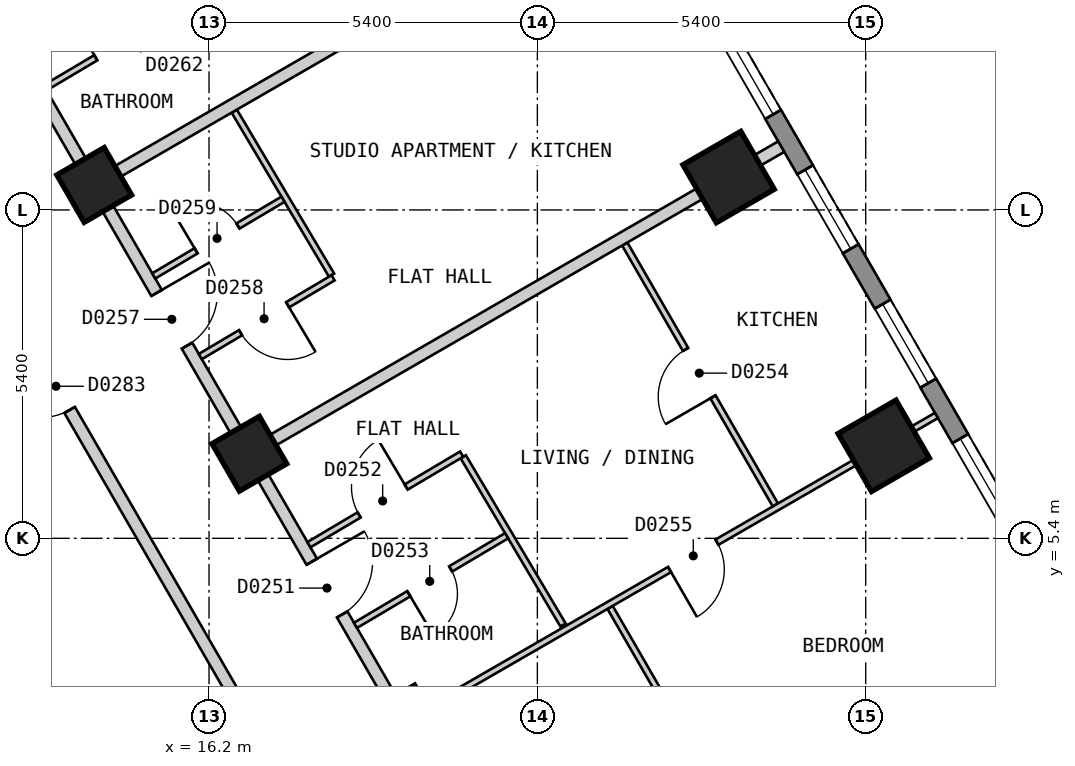
"""IFC4 building model, lengths in metres.
Left out: names, types, materials, properties, quantities, classifications, styles, units other than length and angle.
Written with IfcOpenShell. Run it as: python <this file> out.ifc"""

import sys

from ifc_helpers import new_model, si_unit, direction, frame, frame_2d, origin, origin_2d, place, context, subcontext, project, spatial, polyline, rectangle, outline, extrude, element, fill, save


model = new_model("IFC4")
c1 = context("Model", 3, precision=1e-05, world=origin(), true_north=direction((0.0, 1.0)))
c2 = subcontext(c1, "Body", "Model", "MODEL_VIEW")
j1 = project(units=[si_unit("LENGTHUNIT", "METRE"), si_unit("PLANEANGLEUNIT", "RADIAN")], contexts=[c1])
p1 = place(None, origin())
s1 = spatial("IfcSite", under=j1, at=p1, CompositionType="ELEMENT")
p2 = place(p1, origin())
s2 = spatial("IfcBuilding", under=s1, at=p2, CompositionType="ELEMENT")
p3 = place(p2, frame((0.0, 0.0, 41.4)))
s3 = spatial("IfcBuildingStorey", under=s2, at=p3, CompositionType="ELEMENT", Elevation=41.4)
for number, where, z_axis, x_axis in (
    (1, (29.848, 2.5, 0.0), (0.0, 0.0, 1.0), (-0.5, 0.866, 0.0)),
    (2, (27.297, 6.921, 0.0), (0.0, 0.0, 1.0), (-0.5, 0.866, 0.0)),
    (3, (24.745, 11.341, 0.0), (0.0, 0.0, 1.0), (-0.5, 0.866, 0.0)),
):
    element("IfcColumn", number, at=place(p3, frame(where, z_axis=z_axis, x_axis=x_axis)), inside=s3, PredefinedType="COLUMN", context=c2, shape_type="SweptSolid", body=[
        extrude(rectangle(XDim=1.1, YDim=1.1, at=origin_2d()), origin(), (0.0, 0.0, 1.0), 3.0),
    ])
for number, where, z_axis, x_axis in (
    (4, (19.416, 2.371, 0.0), (0.0, 0.0, 1.0), (-0.5, 0.866, 0.0)),
    (5, (16.864, 6.791, 0.0), (0.0, 0.0, 1.0), (-0.5, 0.866, 0.0)),
    (6, (14.312, 11.211, 0.0), (0.0, 0.0, 1.0), (-0.5, 0.866, 0.0)),
):
    element("IfcColumn", number, at=place(p3, frame(where, z_axis=z_axis, x_axis=x_axis)), inside=s3, PredefinedType="COLUMN", context=c2, shape_type="SweptSolid", body=[
        extrude(rectangle(XDim=0.9, YDim=0.9, at=origin_2d()), origin(), (0.0, 0.0, 1.0), 3.0),
    ])
p4 = place(p3, frame((31.22, 2.425, 0.0), z_axis=(0.0, 0.0, 1.0), x_axis=(-0.500001938803, 0.866024284413, 0.0)))
e7 = element("IfcWall", 7, at=p4, inside=s3, PredefinedType="SOLIDWALL", context=c2, shape_type="SweptSolid", body=[
    extrude(outline(polyline([(0.0, -0.15), (27.02, -0.15), (26.94, 0.15), (0.08, 0.15), (0.0, -0.15)])), origin(), (0.0, 0.0, 1.0), 2.7),
])
p5 = place(p4, frame((1.277, 0.0, 0.15)))
e8 = element("IfcOpeningElement", 8, at=p5, cuts=e7, PredefinedType="OPENING", context=c2, shape_type="SweptSolid", body=[
    extrude(rectangle(XDim=1.5, YDim=2.1, at=frame_2d((0.75, 1.05))), frame((0.0, 0.16, 0.0), z_axis=(0.0, -1.0, 0.0), x_axis=(1.0, 0.0, 0.0)), (0.0, 0.0, 1.0), 0.32),
])
p6 = place(p4, frame((3.829, 0.0, 0.15)))
e9 = element("IfcOpeningElement", 9, at=p6, cuts=e7, PredefinedType="OPENING", context=c2, shape_type="SweptSolid", body=[
    extrude(rectangle(XDim=1.5, YDim=2.1, at=frame_2d((0.75, 1.05))), frame((0.0, 0.16, 0.0), z_axis=(0.0, -1.0, 0.0), x_axis=(1.0, 0.0, 0.0)), (0.0, 0.0, 1.0), 0.32),
])
p7 = place(p4, frame((6.382, 0.0, 0.15)))
e10 = element("IfcOpeningElement", 10, at=p7, cuts=e7, PredefinedType="OPENING", context=c2, shape_type="SweptSolid", body=[
    extrude(rectangle(XDim=1.5, YDim=2.1, at=frame_2d((0.75, 1.05))), frame((0.0, 0.16, 0.0), z_axis=(0.0, -1.0, 0.0), x_axis=(1.0, 0.0, 0.0)), (0.0, 0.0, 1.0), 0.32),
])
p8 = place(p4, frame((8.933, 0.0, 0.15)))
e11 = element("IfcOpeningElement", 11, at=p8, cuts=e7, PredefinedType="OPENING", context=c2, shape_type="SweptSolid", body=[
    extrude(rectangle(XDim=1.5, YDim=2.1, at=frame_2d((0.75, 1.05))), frame((0.0, 0.16, 0.0), z_axis=(0.0, -1.0, 0.0), x_axis=(1.0, 0.0, 0.0)), (0.0, 0.0, 1.0), 0.32),
])
p9 = place(p4, frame((11.485, 0.0, 0.15)))
e12 = element("IfcOpeningElement", 12, at=p9, cuts=e7, PredefinedType="OPENING", context=c2, shape_type="SweptSolid", body=[
    extrude(rectangle(XDim=1.5, YDim=2.1, at=frame_2d((0.75, 1.05))), frame((0.0, 0.16, 0.0), z_axis=(0.0, -1.0, 0.0), x_axis=(1.0, 0.0, 0.0)), (0.0, 0.0, 1.0), 0.32),
])
p10 = place(p4, frame((14.037, 0.0, 0.15)))
e13 = element("IfcOpeningElement", 13, at=p10, cuts=e7, PredefinedType="OPENING", context=c2, shape_type="SweptSolid", body=[
    extrude(rectangle(XDim=1.5, YDim=2.1, at=frame_2d((0.75, 1.05))), frame((0.0, 0.16, 0.0), z_axis=(0.0, -1.0, 0.0), x_axis=(1.0, 0.0, 0.0)), (0.0, 0.0, 1.0), 0.32),
])
p11 = place(p4, frame((16.589, 0.0, 0.15)))
e14 = element("IfcOpeningElement", 14, at=p11, cuts=e7, PredefinedType="OPENING", context=c2, shape_type="SweptSolid", body=[
    extrude(rectangle(XDim=1.5, YDim=2.1, at=frame_2d((0.75, 1.05))), frame((0.0, 0.16, 0.0), z_axis=(0.0, -1.0, 0.0), x_axis=(1.0, 0.0, 0.0)), (0.0, 0.0, 1.0), 0.32),
])
p12 = place(p4, frame((19.141, 0.0, 0.15)))
e15 = element("IfcOpeningElement", 15, at=p12, cuts=e7, PredefinedType="OPENING", context=c2, shape_type="SweptSolid", body=[
    extrude(rectangle(XDim=1.5, YDim=2.1, at=frame_2d((0.75, 1.05))), frame((0.0, 0.16, 0.0), z_axis=(0.0, -1.0, 0.0), x_axis=(1.0, 0.0, 0.0)), (0.0, 0.0, 1.0), 0.32),
])
p13 = place(p4, frame((21.693, 0.0, 0.15)))
e16 = element("IfcOpeningElement", 16, at=p13, cuts=e7, PredefinedType="OPENING", context=c2, shape_type="SweptSolid", body=[
    extrude(rectangle(XDim=1.5, YDim=2.1, at=frame_2d((0.75, 1.05))), frame((0.0, 0.16, 0.0), z_axis=(0.0, -1.0, 0.0), x_axis=(1.0, 0.0, 0.0)), (0.0, 0.0, 1.0), 0.32),
])
p14 = place(p4, frame((24.244, 0.0, 0.15)))
e17 = element("IfcOpeningElement", 17, at=p14, cuts=e7, PredefinedType="OPENING", context=c2, shape_type="SweptSolid", body=[
    extrude(rectangle(XDim=1.5, YDim=2.1, at=frame_2d((0.75, 1.05))), frame((0.0, 0.16, 0.0), z_axis=(0.0, -1.0, 0.0), x_axis=(1.0, 0.0, 0.0)), (0.0, 0.0, 1.0), 0.32),
])
p15 = place(p3, frame((9.18, 15.7, 0.0), z_axis=(0.0, 0.0, 1.0), x_axis=(0.500003652032, -0.866023295272, 0.0)))
e18 = element("IfcWall", 18, at=p15, inside=s3, PredefinedType="PARTITIONING", context=c2, shape_type="SweptSolid", body=[
    extrude(rectangle(XDim=18.012, YDim=0.2, at=frame_2d((9.006, 0.0))), origin(), (0.0, 0.0, 1.0), 2.7),
])
p16 = place(p15, frame((8.556, 0.0, 0.0)))
e19 = element("IfcOpeningElement", 19, at=p16, cuts=e18, PredefinedType="OPENING", context=c2, shape_type="SweptSolid", body=[
    extrude(rectangle(XDim=0.9, YDim=2.1, at=frame_2d((0.45, 1.05))), frame((0.0, 0.11, 0.0), z_axis=(0.0, -1.0, 0.0), x_axis=(1.0, 0.0, 0.0)), (0.0, 0.0, 1.0), 0.22),
])
p17 = place(p3, frame((10.45, 17.9, 0.0), z_axis=(0.0, 0.0, 1.0), x_axis=(0.500034352617, -0.866005569383, 0.0)))
e20 = element("IfcWall", 20, at=p17, inside=s3, PredefinedType="PARTITIONING", context=c2, shape_type="SweptSolid", body=[
    extrude(rectangle(XDim=20.553, YDim=0.2, at=frame_2d((10.276, 0.0))), origin(), (0.0, 0.0, 1.0), 2.7),
])
p18 = place(p17, frame((14.879, 0.0, 0.0)))
e21 = element("IfcOpeningElement", 21, at=p18, cuts=e20, PredefinedType="OPENING", context=c2, shape_type="SweptSolid", body=[
    extrude(rectangle(XDim=1.0, YDim=2.1, at=frame_2d((0.5, 1.05))), frame((0.0, 0.11, 0.0), z_axis=(0.0, -1.0, 0.0), x_axis=(1.0, 0.0, 0.0)), (0.0, 0.0, 1.0), 0.22),
])
p19 = place(p17, frame((9.775, 0.0, 0.0)))
e22 = element("IfcOpeningElement", 22, at=p19, cuts=e20, PredefinedType="OPENING", context=c2, shape_type="SweptSolid", body=[
    extrude(rectangle(XDim=1.0, YDim=2.1, at=frame_2d((0.5, 1.05))), frame((0.0, 0.11, 0.0), z_axis=(0.0, -1.0, 0.0), x_axis=(1.0, 0.0, 0.0)), (0.0, 0.0, 1.0), 0.22),
])
p20 = place(p17, frame((4.671, 0.0, 0.0)))
e23 = element("IfcOpeningElement", 23, at=p20, cuts=e20, PredefinedType="OPENING", context=c2, shape_type="SweptSolid", body=[
    extrude(rectangle(XDim=1.0, YDim=2.1, at=frame_2d((0.5, 1.05))), frame((0.0, 0.11, 0.0), z_axis=(0.0, -1.0, 0.0), x_axis=(1.0, 0.0, 0.0)), (0.0, 0.0, 1.0), 0.22),
])
p21 = place(p3, frame((16.615, 12.425, 0.0), z_axis=(0.0, 0.0, 1.0), x_axis=(0.510241930604, -0.860030913546, 0.0)))
e24 = element("IfcWall", 24, at=p21, inside=s3, PredefinedType="PARTITIONING", context=c2, shape_type="SweptSolid", body=[
    extrude(rectangle(XDim=3.136, YDim=0.1, at=frame_2d((1.568, 0.0))), origin(), (0.0, 0.0, 1.0), 2.7),
])
p22 = place(p3, frame((20.381, 6.741, 0.0), z_axis=(0.0, 0.0, 1.0), x_axis=(0.510224755389, -0.860041103081, 0.0)))
e25 = element("IfcWall", 25, at=p22, inside=s3, PredefinedType="PARTITIONING", context=c2, shape_type="SweptSolid", body=[
    extrude(rectangle(XDim=3.216, YDim=0.1, at=frame_2d((1.608, 0.0))), origin(), (0.0, 0.0, 1.0), 2.7),
])
p23 = place(p3, frame((22.796, 4.264, 0.0), z_axis=(0.0, 0.0, 1.0), x_axis=(0.500099052605, -0.865968208183, 0.0)))
e26 = element("IfcWall", 26, at=p23, inside=s3, PredefinedType="PARTITIONING", context=c2, shape_type="SweptSolid", body=[
    extrude(rectangle(XDim=4.807, YDim=0.1, at=frame_2d((2.404, 0.0))), origin(), (0.0, 0.0, 1.0), 2.7),
])
p24 = place(p23, frame((2.037, 0.0, 0.0)))
e27 = element("IfcOpeningElement", 27, at=p24, cuts=e26, PredefinedType="OPENING", context=c2, shape_type="SweptSolid", body=[
    extrude(rectangle(XDim=0.8, YDim=2.1, at=frame_2d((0.4, 1.05))), frame((0.0, 0.06, 0.0), z_axis=(0.0, -1.0, 0.0), x_axis=(1.0, 0.0, 0.0)), (0.0, 0.0, 1.0), 0.12),
])
p25 = place(p3, frame((23.037, 10.24, 0.0), z_axis=(0.0, 0.0, 1.0), x_axis=(0.499907296314, -0.866078919667, 0.0)))
e28 = element("IfcWall", 28, at=p25, inside=s3, PredefinedType="PARTITIONING", context=c2, shape_type="SweptSolid", body=[
    extrude(rectangle(XDim=4.955, YDim=0.1, at=frame_2d((2.477, 0.0))), origin(), (0.0, 0.0, 1.0), 2.7),
])
p26 = place(p25, frame((2.002, 0.0, 0.0)))
e29 = element("IfcOpeningElement", 29, at=p26, cuts=e28, PredefinedType="OPENING", context=c2, shape_type="SweptSolid", body=[
    extrude(rectangle(XDim=0.9, YDim=2.1, at=frame_2d((0.45, 1.05))), frame((0.0, 0.06, 0.0), z_axis=(0.0, -1.0, 0.0), x_axis=(1.0, 0.0, 0.0)), (0.0, 0.0, 1.0), 0.12),
])
p27 = place(p3, frame((19.503, 2.421, 0.0), z_axis=(0.0, 0.0, 1.0), x_axis=(0.866065245018, 0.499930986609, 0.0)))
e30 = element("IfcWall", 30, at=p27, inside=s3, PredefinedType="PARTITIONING", context=c2, shape_type="SweptSolid", body=[
    extrude(rectangle(XDim=10.0, YDim=0.1, at=frame_2d((5.0, 0.0))), origin(), (0.0, 0.0, 1.0), 2.7),
])
p28 = place(p27, frame((4.932, 0.0, 0.0)))
e31 = element("IfcOpeningElement", 31, at=p28, cuts=e30, PredefinedType="OPENING", context=c2, shape_type="SweptSolid", body=[
    extrude(rectangle(XDim=0.9, YDim=2.1, at=frame_2d((0.45, 1.05))), frame((0.0, 0.06, 0.0), z_axis=(0.0, -1.0, 0.0), x_axis=(1.0, 0.0, 0.0)), (0.0, 0.0, 1.0), 0.12),
])
p29 = place(p3, frame((17.843, 5.295, 0.0), z_axis=(0.0, 0.0, 1.0), x_axis=(0.860078277555, 0.510162088436, 0.0)))
e32 = element("IfcWall", 32, at=p29, inside=s3, PredefinedType="PARTITIONING", context=c2, shape_type="SweptSolid", body=[
    extrude(rectangle(XDim=2.921, YDim=0.1, at=frame_2d((1.46, 0.0))), origin(), (0.0, 0.0, 1.0), 2.7),
])
p30 = place(p29, frame((0.96, 0.0, 0.0)))
e33 = element("IfcOpeningElement", 33, at=p30, cuts=e32, PredefinedType="OPENING", context=c2, shape_type="SweptSolid", body=[
    extrude(rectangle(XDim=0.9, YDim=2.1, at=frame_2d((0.45, 1.05))), frame((0.0, 0.06, 0.0), z_axis=(0.0, -1.0, 0.0), x_axis=(1.0, 0.0, 0.0)), (0.0, 0.0, 1.0), 0.12),
])
p31 = place(p3, frame((18.609, 3.969, 0.0), z_axis=(0.0, 0.0, 1.0), x_axis=(0.860254465905, 0.50986493691, 0.0)))
e34 = element("IfcWall", 34, at=p31, inside=s3, PredefinedType="PARTITIONING", context=c2, shape_type="SweptSolid", body=[
    extrude(rectangle(XDim=2.889, YDim=0.1, at=frame_2d((1.444, 0.0))), origin(), (0.0, 0.0, 1.0), 2.7),
])
p32 = place(p31, frame((1.019, 0.0, 0.0)))
e35 = element("IfcOpeningElement", 35, at=p32, cuts=e34, PredefinedType="OPENING", context=c2, shape_type="SweptSolid", body=[
    extrude(rectangle(XDim=0.8, YDim=2.1, at=frame_2d((0.4, 1.05))), frame((0.0, 0.06, 0.0), z_axis=(0.0, -1.0, 0.0), x_axis=(1.0, 0.0, 0.0)), (0.0, 0.0, 1.0), 0.12),
])
p33 = place(p3, frame((16.057, 8.389, 0.0), z_axis=(0.0, 0.0, 1.0), x_axis=(0.860036770423, 0.510232058499, 0.0)))
e36 = element("IfcWall", 36, at=p33, inside=s3, PredefinedType="PARTITIONING", context=c2, shape_type="SweptSolid", body=[
    extrude(rectangle(XDim=2.538, YDim=0.1, at=frame_2d((1.269, 0.0))), origin(), (0.0, 0.0, 1.0), 2.7),
])
p34 = place(p33, frame((0.769, 0.0, 0.0)))
e37 = element("IfcOpeningElement", 37, at=p34, cuts=e36, PredefinedType="OPENING", context=c2, shape_type="SweptSolid", body=[
    extrude(rectangle(XDim=0.9, YDim=2.1, at=frame_2d((0.45, 1.05))), frame((0.0, 0.06, 0.0), z_axis=(0.0, -1.0, 0.0), x_axis=(1.0, 0.0, 0.0)), (0.0, 0.0, 1.0), 0.12),
])
p35 = place(p3, frame((13.505, 12.809, 0.0), z_axis=(0.0, 0.0, 1.0), x_axis=(0.860070102739, 0.510175870043, 0.0)))
e38 = element("IfcWall", 38, at=p35, inside=s3, PredefinedType="PARTITIONING", context=c2, shape_type="SweptSolid", body=[
    extrude(rectangle(XDim=2.938, YDim=0.1, at=frame_2d((1.469, 0.0))), origin(), (0.0, 0.0, 1.0), 2.7),
])
p36 = place(p35, frame((0.969, 0.0, 0.0)))
e39 = element("IfcOpeningElement", 39, at=p36, cuts=e38, PredefinedType="OPENING", context=c2, shape_type="SweptSolid", body=[
    extrude(rectangle(XDim=0.9, YDim=2.1, at=frame_2d((0.45, 1.05))), frame((0.0, 0.06, 0.0), z_axis=(0.0, -1.0, 0.0), x_axis=(1.0, 0.0, 0.0)), (0.0, 0.0, 1.0), 0.12),
])
p37 = place(p3, frame((15.291, 9.715, 0.0), z_axis=(0.0, 0.0, 1.0), x_axis=(0.860087708271, 0.510146188932, 0.0)))
e40 = element("IfcWall", 40, at=p37, inside=s3, PredefinedType="PARTITIONING", context=c2, shape_type="SweptSolid", body=[
    extrude(rectangle(XDim=2.472, YDim=0.1, at=frame_2d((1.236, 0.0))), origin(), (0.0, 0.0, 1.0), 2.7),
])
p38 = place(p37, frame((0.81, 0.0, 0.0)))
e41 = element("IfcOpeningElement", 41, at=p38, cuts=e40, PredefinedType="OPENING", context=c2, shape_type="SweptSolid", body=[
    extrude(rectangle(XDim=0.8, YDim=2.1, at=frame_2d((0.4, 1.05))), frame((0.0, 0.06, 0.0), z_axis=(0.0, -1.0, 0.0), x_axis=(1.0, 0.0, 0.0)), (0.0, 0.0, 1.0), 0.12),
])
p39 = place(p3, frame((25.519, 0.001, 0.0), z_axis=(0.0, 0.0, 1.0), x_axis=(0.86609140076, 0.499885672459, 0.0)))
e42 = element("IfcWall", 42, at=p39, inside=s3, PredefinedType="PARTITIONING", context=c2, shape_type="SweptSolid", body=[
    extrude(rectangle(XDim=6.0, YDim=0.2, at=frame_2d((3.0, 0.0))), origin(), (0.0, 0.0, 1.0), 2.7),
])
for number, where, z_axis, x_axis in (
    (43, (16.95, 6.841, 0.0), (0.0, 0.0, 1.0), (0.866, 0.5, 0.0)),
    (44, (14.399, 11.261, 0.0), (0.0, 0.0, 1.0), (0.866, 0.5, 0.0)),
):
    element("IfcWall", number, at=place(p3, frame(where, z_axis=z_axis, x_axis=x_axis)), inside=s3, PredefinedType="PARTITIONING", context=c2, shape_type="SweptSolid", body=[
        extrude(rectangle(XDim=10.0, YDim=0.2, at=frame_2d((5.0, 0.0))), origin(), (0.0, 0.0, 1.0), 2.7),
    ])
p40 = place(p6, origin())
e45 = element("IfcWindow", 45, at=p40, inside=s3, PartitioningType="SINGLE_PANEL", PredefinedType="WINDOW", context=c2, shape_type="SweptSolid", body=[
    extrude(rectangle(XDim=1.5, YDim=2.1, at=frame_2d((0.75, 1.05))), frame((0.0, 0.03, 0.0), z_axis=(0.0, -1.0, 0.0), x_axis=(1.0, 0.0, 0.0)), (0.0, 0.0, 1.0), 0.06),
])
fill(e9, e45)
p41 = place(p7, origin())
e46 = element("IfcWindow", 46, at=p41, inside=s3, PartitioningType="SINGLE_PANEL", PredefinedType="WINDOW", context=c2, shape_type="SweptSolid", body=[
    extrude(rectangle(XDim=1.5, YDim=2.1, at=frame_2d((0.75, 1.05))), frame((0.0, 0.03, 0.0), z_axis=(0.0, -1.0, 0.0), x_axis=(1.0, 0.0, 0.0)), (0.0, 0.0, 1.0), 0.06),
])
fill(e10, e46)
p42 = place(p8, origin())
e47 = element("IfcWindow", 47, at=p42, inside=s3, PartitioningType="SINGLE_PANEL", PredefinedType="WINDOW", context=c2, shape_type="SweptSolid", body=[
    extrude(rectangle(XDim=1.5, YDim=2.1, at=frame_2d((0.75, 1.05))), frame((0.0, 0.03, 0.0), z_axis=(0.0, -1.0, 0.0), x_axis=(1.0, 0.0, 0.0)), (0.0, 0.0, 1.0), 0.06),
])
fill(e11, e47)
p43 = place(p9, origin())
e48 = element("IfcWindow", 48, at=p43, inside=s3, PartitioningType="SINGLE_PANEL", PredefinedType="WINDOW", context=c2, shape_type="SweptSolid", body=[
    extrude(rectangle(XDim=1.5, YDim=2.1, at=frame_2d((0.75, 1.05))), frame((0.0, 0.03, 0.0), z_axis=(0.0, -1.0, 0.0), x_axis=(1.0, 0.0, 0.0)), (0.0, 0.0, 1.0), 0.06),
])
fill(e12, e48)
p44 = place(p18, origin())
e49 = element("IfcDoor", 49, at=p44, inside=s3, OperationType="SINGLE_SWING_LEFT", PredefinedType="DOOR", context=c2, shape_type="SweptSolid", body=[
    extrude(rectangle(XDim=1.0, YDim=2.1, at=frame_2d((0.5, 1.05))), frame((0.0, 0.025, 0.0), z_axis=(0.0, -1.0, 0.0), x_axis=(1.0, 0.0, 0.0)), (0.0, 0.0, 1.0), 0.05),
])
fill(e21, e49)
p45 = place(p30, origin())
e50 = element("IfcDoor", 50, at=p45, inside=s3, OperationType="SINGLE_SWING_RIGHT", PredefinedType="DOOR", context=c2, shape_type="SweptSolid", body=[
    extrude(rectangle(XDim=0.9, YDim=2.1, at=frame_2d((0.45, 1.05))), frame((0.0, 0.025, 0.0), z_axis=(0.0, -1.0, 0.0), x_axis=(1.0, 0.0, 0.0)), (0.0, 0.0, 1.0), 0.05),
])
fill(e33, e50)
p46 = place(p32, origin())
e51 = element("IfcDoor", 51, at=p46, inside=s3, OperationType="SINGLE_SWING_LEFT", PredefinedType="DOOR", context=c2, shape_type="SweptSolid", body=[
    extrude(rectangle(XDim=0.8, YDim=2.1, at=frame_2d((0.4, 1.05))), frame((0.0, 0.025, 0.0), z_axis=(0.0, -1.0, 0.0), x_axis=(1.0, 0.0, 0.0)), (0.0, 0.0, 1.0), 0.05),
])
fill(e35, e51)
p47 = place(p26, origin())
e52 = element("IfcDoor", 52, at=p47, inside=s3, OperationType="SINGLE_SWING_RIGHT", PredefinedType="DOOR", context=c2, shape_type="SweptSolid", body=[
    extrude(rectangle(XDim=0.9, YDim=2.1, at=frame_2d((0.45, 1.05))), frame((0.0, 0.025, 0.0), z_axis=(0.0, -1.0, 0.0), x_axis=(1.0, 0.0, 0.0)), (0.0, 0.0, 1.0), 0.05),
])
fill(e29, e52)
p48 = place(p28, origin())
e53 = element("IfcDoor", 53, at=p48, inside=s3, OperationType="SINGLE_SWING_LEFT", PredefinedType="DOOR", context=c2, shape_type="SweptSolid", body=[
    extrude(rectangle(XDim=0.9, YDim=2.1, at=frame_2d((0.45, 1.05))), frame((0.0, 0.025, 0.0), z_axis=(0.0, -1.0, 0.0), x_axis=(1.0, 0.0, 0.0)), (0.0, 0.0, 1.0), 0.05),
])
fill(e31, e53)
p49 = place(p19, origin())
e54 = element("IfcDoor", 54, at=p49, inside=s3, OperationType="SINGLE_SWING_LEFT", PredefinedType="DOOR", context=c2, shape_type="SweptSolid", body=[
    extrude(rectangle(XDim=1.0, YDim=2.1, at=frame_2d((0.5, 1.05))), frame((0.0, 0.025, 0.0), z_axis=(0.0, -1.0, 0.0), x_axis=(1.0, 0.0, 0.0)), (0.0, 0.0, 1.0), 0.05),
])
fill(e22, e54)
p50 = place(p34, origin())
e55 = element("IfcDoor", 55, at=p50, inside=s3, OperationType="SINGLE_SWING_RIGHT", PredefinedType="DOOR", context=c2, shape_type="SweptSolid", body=[
    extrude(rectangle(XDim=0.9, YDim=2.1, at=frame_2d((0.45, 1.05))), frame((0.0, 0.025, 0.0), z_axis=(0.0, -1.0, 0.0), x_axis=(1.0, 0.0, 0.0)), (0.0, 0.0, 1.0), 0.05),
])
fill(e37, e55)
p51 = place(p38, origin())
e56 = element("IfcDoor", 56, at=p51, inside=s3, OperationType="SINGLE_SWING_LEFT", PredefinedType="DOOR", context=c2, shape_type="SweptSolid", body=[
    extrude(rectangle(XDim=0.8, YDim=2.1, at=frame_2d((0.4, 1.05))), frame((0.0, 0.025, 0.0), z_axis=(0.0, -1.0, 0.0), x_axis=(1.0, 0.0, 0.0)), (0.0, 0.0, 1.0), 0.05),
])
fill(e41, e56)
p52 = place(p36, origin())
e57 = element("IfcDoor", 57, at=p52, inside=s3, OperationType="SINGLE_SWING_LEFT", PredefinedType="DOOR", context=c2, shape_type="SweptSolid", body=[
    extrude(rectangle(XDim=0.9, YDim=2.1, at=frame_2d((0.45, 1.05))), frame((0.0, 0.025, 0.0), z_axis=(0.0, -1.0, 0.0), x_axis=(1.0, 0.0, 0.0)), (0.0, 0.0, 1.0), 0.05),
])
fill(e39, e57)
p53 = place(p16, origin())
e58 = element("IfcDoor", 58, at=p53, inside=s3, OperationType="SINGLE_SWING_LEFT", PredefinedType="DOOR", context=c2, shape_type="SweptSolid", body=[
    extrude(rectangle(XDim=0.9, YDim=2.1, at=frame_2d((0.45, 1.05))), frame((0.0, 0.025, 0.0), z_axis=(0.0, -1.0, 0.0), x_axis=(1.0, 0.0, 0.0)), (0.0, 0.0, 1.0), 0.05),
])
fill(e19, e58)
save(model, sys.argv[1])
